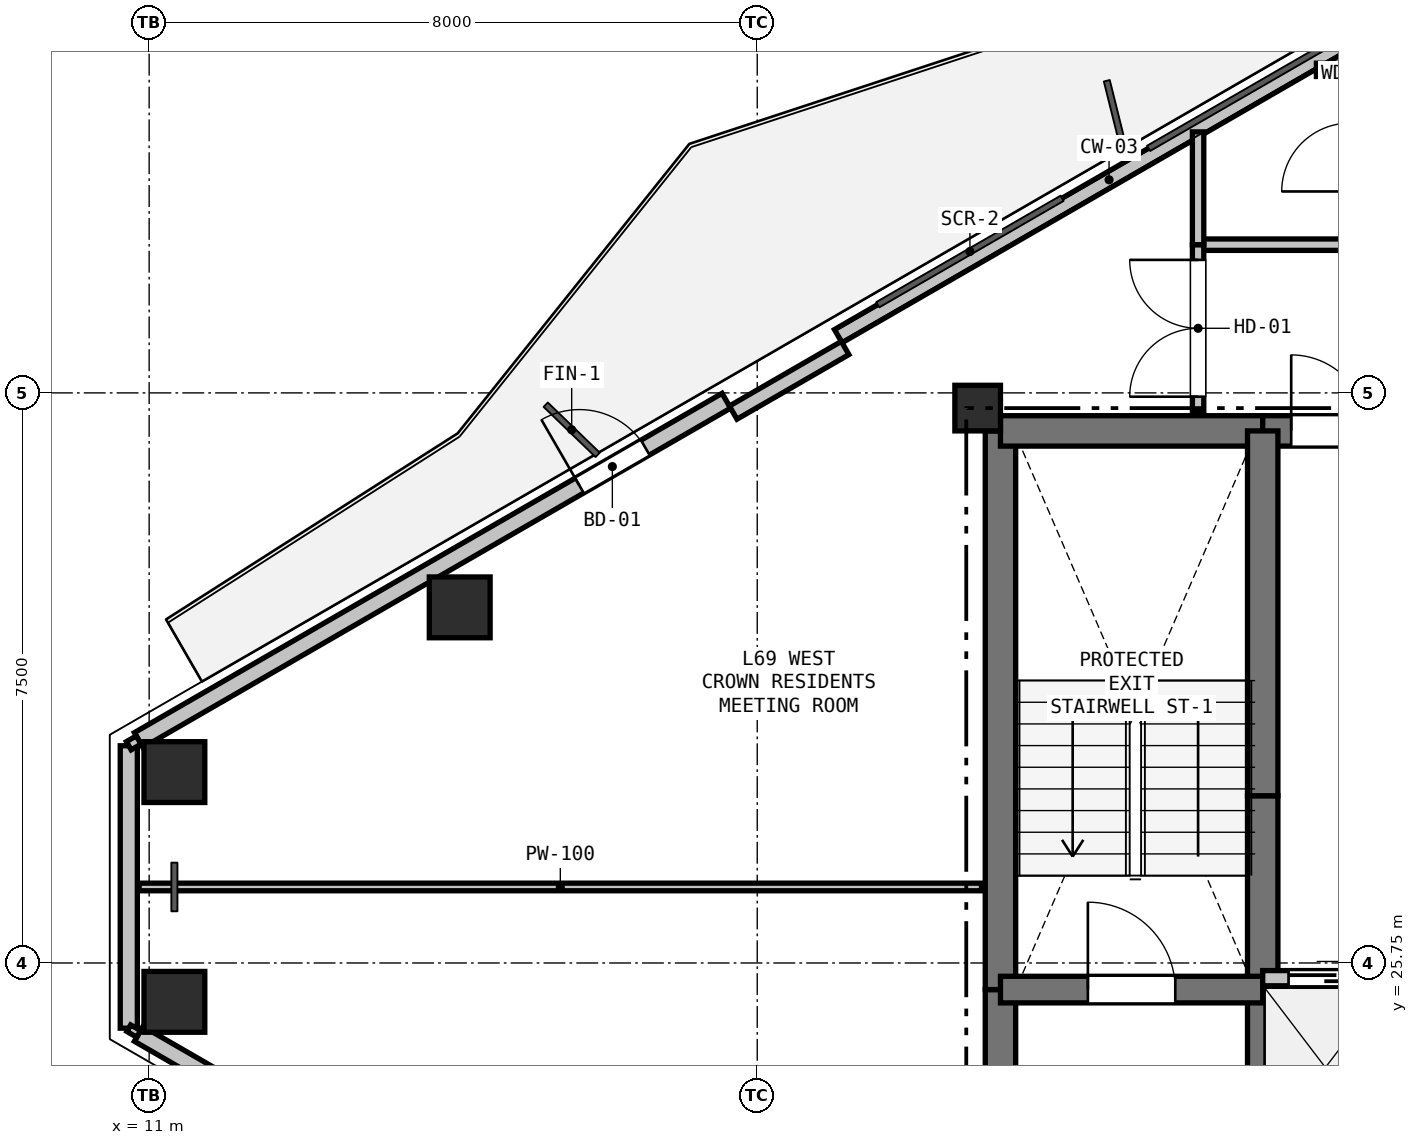
"""IFC4 building model, lengths in metres.
Left out: names, types, materials, properties, quantities, classifications, styles, units other than length and angle.
Written with IfcOpenShell. Run it as: python <this file> out.ifc"""

import sys

from ifc_helpers import new_model, si_unit, direction, frame, frame_2d, origin, origin_2d, place, context, subcontext, project, spatial, rectangle, hollow_rectangle, extrude, element, fill, save


model = new_model("IFC4")
c1 = context("Model", 3, precision=1e-05, world=origin(), true_north=direction((0.0, 1.0)))
c2 = subcontext(c1, "Body", "Model", "MODEL_VIEW")
j1 = project(units=[si_unit("LENGTHUNIT", "METRE"), si_unit("PLANEANGLEUNIT", "RADIAN")], contexts=[c1])
p1 = place(None, origin())
s1 = spatial("IfcSite", under=j1, at=p1, CompositionType="ELEMENT")
p2 = place(p1, origin())
s2 = spatial("IfcBuilding", under=s1, at=p2, CompositionType="ELEMENT")
p3 = place(p2, frame((0.0, 0.0, 246.3)))
s3 = spatial("IfcBuildingStorey", under=s2, at=p3, CompositionType="ELEMENT", Elevation=246.3)
p4 = place(p3, frame((21.9, 33.05, 0.0), z_axis=(0.0, 0.0, 1.0), x_axis=(1.0, 0.0, 0.0)))
e1 = element("IfcColumn", 1, at=p4, inside=s3, PredefinedType="COLUMN", context=c2, shape_type="SweptSolid", body=[
    extrude(rectangle(XDim=0.6, YDim=0.6, at=origin_2d()), origin(), (0.0, 0.0, 1.0), 3.3),
])
for number, where, z_axis, x_axis in (
    (2, (11.332, 28.261, 0.0), (0.0, 0.0, 1.0), (1.0, 0.0, 0.0)),
    (3, (15.086, 30.428, 0.0), (0.0, 0.0, 1.0), (1.0, 0.0, 0.0)),
    (4, (11.332, 25.239, 0.0), (0.0, 0.0, 1.0), (1.0, 0.0, 0.0)),
):
    element("IfcColumn", number, at=place(p3, frame(where, z_axis=z_axis, x_axis=x_axis)), inside=s3, PredefinedType="COLUMN", context=c2, shape_type="SweptSolid", body=[
        extrude(hollow_rectangle(XDim=0.8, YDim=0.8, WallThickness=0.025, at=origin_2d()), origin(), (0.0, 0.0, 1.0), 3.3),
    ])
p5 = place(p3, frame((10.732, 24.892, 0.0), z_axis=(0.0, 0.0, 1.0), x_axis=(0.0, 1.0, 0.0)))
e5 = element("IfcWall", 5, at=p5, inside=s3, PredefinedType="SOLIDWALL", context=c2, shape_type="SweptSolid", body=[
    extrude(rectangle(XDim=3.715, YDim=0.225, at=frame_2d((1.858, 0.0))), origin(), (0.0, 0.0, 1.0), 2.64),
])
p6 = place(p3, frame((10.862, 28.683, 0.0), z_axis=(0.0, 0.0, 1.0), x_axis=(0.866026655105, 0.499997832642, 0.0)))
e6 = element("IfcWall", 6, at=p6, inside=s3, PredefinedType="SOLIDWALL", context=c2, shape_type="SweptSolid", body=[
    extrude(rectangle(XDim=8.928, YDim=0.225, at=frame_2d((4.464, 0.0))), origin(), (0.0, 0.0, 1.0), 2.64),
])
p7 = place(p6, frame((6.696, 0.0, 0.0)))
e7 = element("IfcOpeningElement", 7, at=p7, cuts=e6, PredefinedType="OPENING", context=c2, shape_type="SweptSolid", body=[
    extrude(rectangle(XDim=1.0, YDim=2.1, at=frame_2d((0.5, 1.05))), frame((0.0, 0.123, 0.0), z_axis=(0.0, -1.0, 0.0), x_axis=(1.0, 0.0, 0.0)), (0.0, 0.0, 1.0), 0.245),
])
p8 = place(p3, frame((20.066, 33.997, 0.0), z_axis=(0.0, 0.0, 1.0), x_axis=(0.866019557082, 0.500010126649, 0.0)))
e8 = element("IfcWall", 8, at=p8, inside=s3, PredefinedType="PARAPET", context=c2, shape_type="SweptSolid", body=[
    extrude(rectangle(XDim=8.228, YDim=0.2, at=frame_2d((4.114, 0.0))), origin(), (0.0, 0.0, 1.0), 0.2),
])
p9 = place(p3, frame((18.684, 32.991, 0.0), z_axis=(0.0, 0.0, 1.0), x_axis=(0.866025371046, 0.500000056704, 0.0)))
e9 = element("IfcWall", 9, at=p9, inside=s3, PredefinedType="PARAPET", context=c2, shape_type="SweptSolid", body=[
    extrude(rectangle(XDim=1.7, YDim=0.2, at=frame_2d((0.85, 0.0))), origin(), (0.0, 0.0, 1.0), 2.64),
])
p10 = place(p3, frame((18.594, 20.354, 0.0), z_axis=(0.0, 0.0, 1.0), x_axis=(-0.866026655105, 0.499997832642, 0.0)))
e10 = element("IfcWall", 10, at=p10, inside=s3, PredefinedType="SOLIDWALL", context=c2, shape_type="SweptSolid", body=[
    extrude(rectangle(XDim=8.928, YDim=0.225, at=frame_2d((4.464, 0.0))), origin(), (0.0, 0.0, 1.0), 2.64),
])
p11 = place(p3, frame((22.2, 20.75, 0.0), z_axis=(0.0, 0.0, 1.0), x_axis=(0.0, 1.0, 0.0)))
e11 = element("IfcWall", 11, at=p11, inside=s3, PredefinedType="SHEAR", context=c2, shape_type="SweptSolid", body=[
    extrude(rectangle(XDim=4.65, YDim=0.4, at=frame_2d((2.325, 0.0))), origin(), (0.0, 0.0, 1.0), 3.02),
])
p12 = place(p3, frame((22.2, 25.4, 0.0), z_axis=(0.0, 0.0, 1.0), x_axis=(0.0, 1.0, 0.0)))
e12 = element("IfcWall", 12, at=p12, inside=s3, PredefinedType="SHEAR", context=c2, shape_type="SweptSolid", body=[
    extrude(rectangle(XDim=7.35, YDim=0.4, at=frame_2d((3.675, 0.0))), origin(), (0.0, 0.0, 1.0), 3.02),
])
p13 = place(p3, frame((22.2, 32.75, 0.0), z_axis=(0.0, 0.0, 1.0), x_axis=(1.0, 0.0, 0.0)))
e13 = element("IfcWall", 13, at=p13, inside=s3, PredefinedType="SHEAR", context=c2, shape_type="SweptSolid", body=[
    extrude(rectangle(XDim=3.45, YDim=0.4, at=frame_2d((1.725, 0.0))), origin(), (0.0, 0.0, 1.0), 3.02),
])
p14 = place(p3, frame((25.65, 32.75, 0.0), z_axis=(0.0, 0.0, 1.0), x_axis=(1.0, 0.0, 0.0)))
e14 = element("IfcWall", 14, at=p14, inside=s3, PredefinedType="SHEAR", context=c2, shape_type="SweptSolid", body=[
    extrude(rectangle(XDim=1.75, YDim=0.4, at=frame_2d((0.875, 0.0))), origin(), (0.0, 0.0, 1.0), 3.02),
])
p15 = place(p14, frame((0.375, 0.0, 0.0)))
e15 = element("IfcOpeningElement", 15, at=p15, cuts=e14, PredefinedType="OPENING", context=c2, shape_type="SweptSolid", body=[
    extrude(rectangle(XDim=1.0, YDim=2.15, at=frame_2d((0.5, 1.075))), frame((0.0, 0.21, 0.0), z_axis=(0.0, -1.0, 0.0), x_axis=(1.0, 0.0, 0.0)), (0.0, 0.0, 1.0), 0.42),
])
p16 = place(p3, frame((25.65, 22.75, 0.0), z_axis=(0.0, 0.0, 1.0), x_axis=(0.0, 1.0, 0.0)))
e16 = element("IfcWall", 16, at=p16, inside=s3, PredefinedType="SHEAR", context=c2, shape_type="SweptSolid", body=[
    extrude(rectangle(XDim=2.8, YDim=0.4, at=frame_2d((1.4, 0.0))), origin(), (0.0, 0.0, 1.0), 3.02),
])
p17 = place(p3, frame((25.65, 25.55, 0.0), z_axis=(0.0, 0.0, 1.0), x_axis=(0.0, 1.0, 0.0)))
e17 = element("IfcWall", 17, at=p17, inside=s3, PredefinedType="SHEAR", context=c2, shape_type="SweptSolid", body=[
    extrude(rectangle(XDim=2.4, YDim=0.4, at=frame_2d((1.2, 0.0))), origin(), (0.0, 0.0, 1.0), 3.02),
])
p18 = place(p3, frame((25.65, 27.95, 0.0), z_axis=(0.0, 0.0, 1.0), x_axis=(0.0, 1.0, 0.0)))
e18 = element("IfcWall", 18, at=p18, inside=s3, PredefinedType="SHEAR", context=c2, shape_type="SweptSolid", body=[
    extrude(rectangle(XDim=4.8, YDim=0.4, at=frame_2d((2.4, 0.0))), origin(), (0.0, 0.0, 1.0), 3.02),
])
p19 = place(p3, frame((22.2, 25.4, 0.0), z_axis=(0.0, 0.0, 1.0), x_axis=(1.0, 0.0, 0.0)))
e19 = element("IfcWall", 19, at=p19, inside=s3, PredefinedType="SHEAR", context=c2, shape_type="SweptSolid", body=[
    extrude(rectangle(XDim=3.45, YDim=0.35, at=frame_2d((1.725, 0.0))), origin(), (0.0, 0.0, 1.0), 3.02),
])
p20 = place(p19, frame((1.15, 0.0, 0.0)))
e20 = element("IfcOpeningElement", 20, at=p20, cuts=e19, PredefinedType="OPENING", context=c2, shape_type="SweptSolid", body=[
    extrude(rectangle(XDim=1.15, YDim=2.15, at=frame_2d((0.575, 1.075))), frame((0.0, 0.185, 0.0), z_axis=(0.0, -1.0, 0.0), x_axis=(1.0, 0.0, 0.0)), (0.0, 0.0, 1.0), 0.37),
])
p21 = place(p3, frame((25.65, 25.55, 0.0), z_axis=(0.0, 0.0, 1.0), x_axis=(1.0, 0.0, 0.0)))
e21 = element("IfcWall", 21, at=p21, inside=s3, PredefinedType="PARTITIONING", context=c2, shape_type="SweptSolid", body=[
    extrude(rectangle(XDim=4.95, YDim=0.2, at=frame_2d((2.475, 0.0))), origin(), (0.0, 0.0, 1.0), 3.02),
])
p22 = place(p21, frame((0.34, 0.0, 0.0)))
e22 = element("IfcOpeningElement", 22, at=p22, cuts=e21, PredefinedType="OPENING", context=c2, shape_type="SweptSolid", body=[
    extrude(rectangle(XDim=1.1, YDim=2.15, at=frame_2d((0.55, 1.075))), frame((0.0, 0.11, 0.0), z_axis=(0.0, -1.0, 0.0), x_axis=(1.0, 0.0, 0.0)), (0.0, 0.0, 1.0), 0.22),
])
p23 = place(p21, frame((1.99, 0.0, 0.0)))
e23 = element("IfcOpeningElement", 23, at=p23, cuts=e21, PredefinedType="OPENING", context=c2, shape_type="SweptSolid", body=[
    extrude(rectangle(XDim=1.1, YDim=2.15, at=frame_2d((0.55, 1.075))), frame((0.0, 0.11, 0.0), z_axis=(0.0, -1.0, 0.0), x_axis=(1.0, 0.0, 0.0)), (0.0, 0.0, 1.0), 0.22),
])
p24 = place(p21, frame((3.64, 0.0, 0.0)))
e24 = element("IfcOpeningElement", 24, at=p24, cuts=e21, PredefinedType="OPENING", context=c2, shape_type="SweptSolid", body=[
    extrude(rectangle(XDim=1.1, YDim=2.15, at=frame_2d((0.55, 1.075))), frame((0.0, 0.11, 0.0), z_axis=(0.0, -1.0, 0.0), x_axis=(1.0, 0.0, 0.0)), (0.0, 0.0, 1.0), 0.22),
])
p25 = place(p3, frame((24.8, 35.2, 0.0), z_axis=(0.0, 0.0, 1.0), x_axis=(1.0, 0.0, 0.0)))
e25 = element("IfcWall", 25, at=p25, inside=s3, PredefinedType="PARTITIONING", context=c2, shape_type="SweptSolid", body=[
    extrude(rectangle(XDim=2.0, YDim=0.15, at=frame_2d((1.0, 0.0))), origin(), (0.0, 0.0, 1.0), 3.02),
])
p26 = place(p3, frame((24.8, 33.0, 0.0), z_axis=(0.0, 0.0, 1.0), x_axis=(0.0, 1.0, 0.0)))
e26 = element("IfcWall", 26, at=p26, inside=s3, PredefinedType="PARTITIONING", context=c2, shape_type="SweptSolid", body=[
    extrude(rectangle(XDim=2.2, YDim=0.15, at=frame_2d((1.1, 0.0))), origin(), (0.0, 0.0, 1.0), 2.545),
])
p27 = place(p26, frame((0.2, 0.0, 0.0)))
e27 = element("IfcOpeningElement", 27, at=p27, cuts=e26, PredefinedType="OPENING", context=c2, shape_type="SweptSolid", body=[
    extrude(rectangle(XDim=1.8, YDim=2.2, at=frame_2d((0.9, 1.1))), frame((0.0, 0.085, 0.0), z_axis=(0.0, -1.0, 0.0), x_axis=(1.0, 0.0, 0.0)), (0.0, 0.0, 1.0), 0.17),
])
p28 = place(p3, frame((24.8, 35.2, 0.0), z_axis=(0.0, 0.0, 1.0), x_axis=(0.0, 1.0, 0.0)))
e28 = element("IfcWall", 28, at=p28, inside=s3, PredefinedType="PARTITIONING", context=c2, shape_type="SweptSolid", body=[
    extrude(rectangle(XDim=1.484, YDim=0.15, at=frame_2d((0.742, 0.0))), origin(), (0.0, 0.0, 1.0), 2.365),
])
p29 = place(p3, frame((26.357, 37.5, 0.0), z_axis=(0.0, 0.0, 1.0), x_axis=(1.0, 0.0, 0.0)))
e29 = element("IfcWall", 29, at=p29, inside=s3, PredefinedType="PLUMBINGWALL", context=c2, shape_type="SweptSolid", body=[
    extrude(rectangle(XDim=0.428, YDim=0.175, at=frame_2d((0.214, 0.0))), origin(), (0.0, 0.0, 1.0), 3.02),
])
p30 = place(p3, frame((21.95, 26.75, 0.0), z_axis=(0.0, 0.0, 1.0), x_axis=(-1.0, 0.0, 0.0)))
e30 = element("IfcWall", 30, at=p30, inside=s3, PredefinedType="PARTITIONING", context=c2, shape_type="SweptSolid", body=[
    extrude(rectangle(XDim=11.082, YDim=0.1, at=frame_2d((5.541, 0.0))), origin(), (0.0, 0.0, 1.0), 2.545),
])
p31 = place(p3, frame((10.732, 28.608, 0.0), z_axis=(0.0, 0.0, 1.0), x_axis=(0.866131372301, 0.499816412211, 0.0)))
e31 = element("IfcWall", 31, at=p31, inside=s3, PredefinedType="PARTITIONING", context=c2, shape_type="SweptSolid", body=[
    extrude(rectangle(XDim=0.15, YDim=0.125, at=frame_2d((0.075, 0.0))), origin(), (0.0, 0.0, 1.0), 3.02),
])
p32 = place(p3, frame((10.862, 24.817, 0.0), z_axis=(0.0, 0.0, 1.0), x_axis=(-0.866131372301, 0.499816412211, 0.0)))
e32 = element("IfcWall", 32, at=p32, inside=s3, PredefinedType="PARTITIONING", context=c2, shape_type="SweptSolid", body=[
    extrude(rectangle(XDim=0.15, YDim=0.1, at=frame_2d((0.075, 0.0))), origin(), (0.0, 0.0, 1.0), 3.02),
])
p33 = place(p7, origin())
e33 = element("IfcDoor", 33, at=p33, inside=s3, OperationType="SINGLE_SWING_LEFT", PredefinedType="DOOR", context=c2, shape_type="SweptSolid", body=[
    extrude(rectangle(XDim=1.0, YDim=2.1, at=frame_2d((0.5, 1.05))), frame((0.0, 0.025, 0.0), z_axis=(0.0, -1.0, 0.0), x_axis=(1.0, 0.0, 0.0)), (0.0, 0.0, 1.0), 0.05),
])
fill(e7, e33)
p34 = place(p22, origin())
e34 = element("IfcDoor", 34, at=p34, inside=s3, OperationType="SLIDING_TO_LEFT", PredefinedType="DOOR", context=c2, shape_type="SweptSolid", body=[
    extrude(rectangle(XDim=1.1, YDim=2.15, at=frame_2d((0.55, 1.075))), frame((0.0, 0.025, 0.0), z_axis=(0.0, -1.0, 0.0), x_axis=(1.0, 0.0, 0.0)), (0.0, 0.0, 1.0), 0.05),
])
fill(e22, e34)
p35 = place(p15, origin())
e35 = element("IfcDoor", 35, at=p35, inside=s3, OperationType="SINGLE_SWING_LEFT", PredefinedType="DOOR", context=c2, shape_type="SweptSolid", body=[
    extrude(rectangle(XDim=1.0, YDim=2.15, at=frame_2d((0.5, 1.075))), frame((0.0, 0.025, 0.0), z_axis=(0.0, -1.0, 0.0), x_axis=(1.0, 0.0, 0.0)), (0.0, 0.0, 1.0), 0.05),
])
fill(e15, e35)
p36 = place(p20, origin())
e36 = element("IfcDoor", 36, at=p36, inside=s3, OperationType="SINGLE_SWING_LEFT", PredefinedType="DOOR", context=c2, shape_type="SweptSolid", body=[
    extrude(rectangle(XDim=1.15, YDim=2.15, at=frame_2d((0.575, 1.075))), frame((0.0, 0.025, 0.0), z_axis=(0.0, -1.0, 0.0), x_axis=(1.0, 0.0, 0.0)), (0.0, 0.0, 1.0), 0.05),
])
fill(e20, e36)
p37 = place(p27, origin())
e37 = element("IfcDoor", 37, at=p37, inside=s3, OperationType="DOUBLE_DOOR_SINGLE_SWING", PredefinedType="DOOR", context=c2, shape_type="SweptSolid", body=[
    extrude(rectangle(XDim=1.8, YDim=2.2, at=frame_2d((0.9, 1.1))), frame((0.0, 0.025, 0.0), z_axis=(0.0, -1.0, 0.0), x_axis=(1.0, 0.0, 0.0)), (0.0, 0.0, 1.0), 0.05),
])
fill(e27, e37)
save(model, sys.argv[1])
